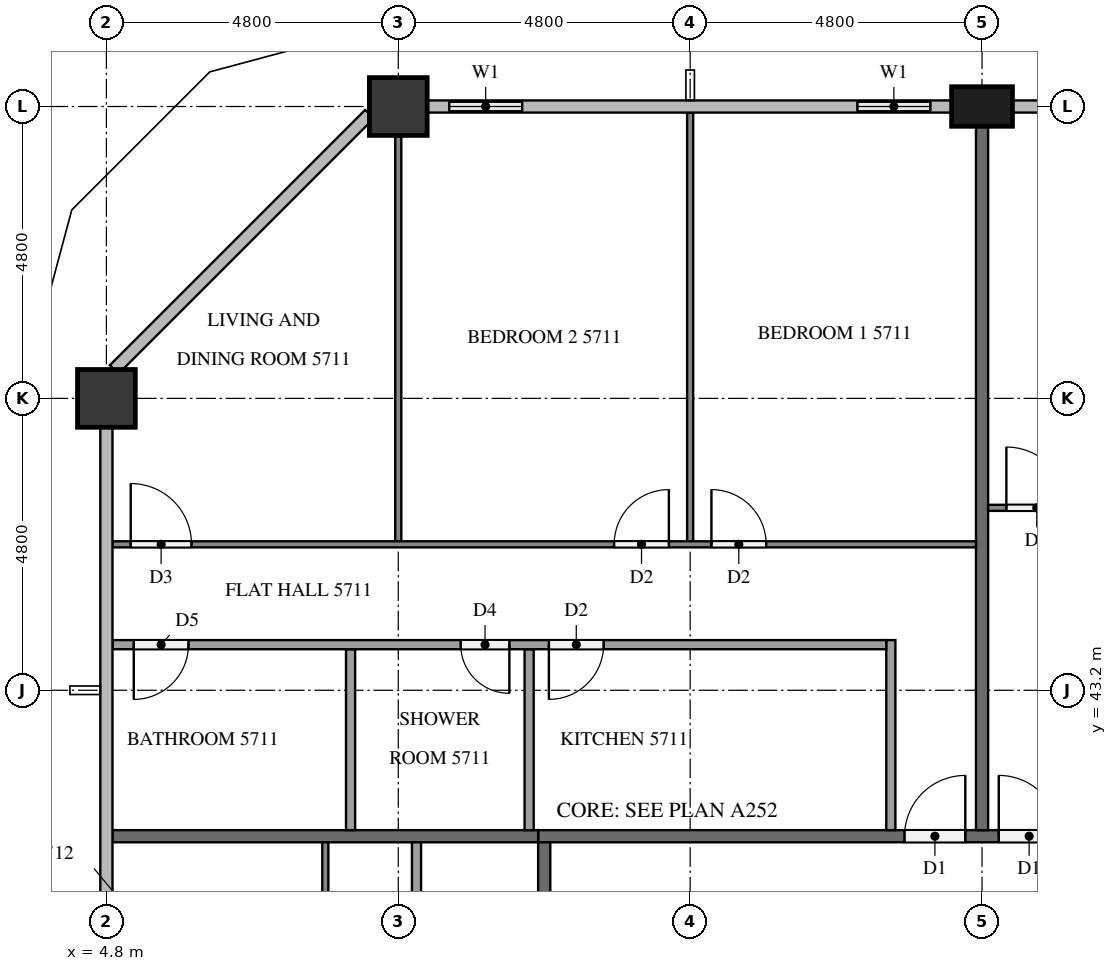
"""IFC4 building model, lengths in metres.
Left out: names, types, materials, properties, quantities, classifications, styles, units other than length and angle.
Written with IfcOpenShell. Run it as: python <this file> out.ifc"""

import sys

from ifc_helpers import new_model, si_unit, direction, frame, frame_2d, origin, origin_2d, place, context, subcontext, project, spatial, rectangle, extrude, element, fill, save


model = new_model("IFC4")
c1 = context("Model", 3, precision=1e-05, world=origin(), true_north=direction((0.0, 1.0)))
c2 = subcontext(c1, "Body", "Model", "MODEL_VIEW")
j1 = project(units=[si_unit("LENGTHUNIT", "METRE"), si_unit("PLANEANGLEUNIT", "RADIAN")], contexts=[c1])
p1 = place(None, origin())
s1 = spatial("IfcSite", under=j1, at=p1, CompositionType="ELEMENT")
p2 = place(p1, origin())
s2 = spatial("IfcBuilding", under=s1, at=p2, CompositionType="ELEMENT")
p3 = place(p2, frame((0.0, 0.0, 219.3)))
s3 = spatial("IfcBuildingStorey", under=s2, at=p3, CompositionType="ELEMENT", Elevation=219.3)
p4 = place(p3, frame((19.2, 52.8, 0.0), z_axis=(0.0, 0.0, 1.0), x_axis=(1.0, 0.0, 0.0)))
e1 = element("IfcColumn", 1, at=p4, inside=s3, PredefinedType="COLUMN", context=c2, shape_type="SweptSolid", body=[
    extrude(rectangle(XDim=1.0, YDim=0.65, at=origin_2d()), origin(), (0.0, 0.0, 1.0), 3.2),
])
for number, where, z_axis, x_axis in (
    (2, (9.6, 52.8, 0.0), (0.0, 0.0, 1.0), (1.0, 0.0, 0.0)),
    (3, (4.8, 48.0, 0.0), (0.0, 0.0, 1.0), (1.0, 0.0, 0.0)),
):
    element("IfcColumn", number, at=place(p3, frame(where, z_axis=z_axis, x_axis=x_axis)), inside=s3, PredefinedType="COLUMN", context=c2, shape_type="SweptSolid", body=[
        extrude(rectangle(XDim=0.95, YDim=0.95, at=origin_2d()), origin(), (0.0, 0.0, 1.0), 3.2),
    ])
p5 = place(p3, frame((18.7, 52.8, 0.0), z_axis=(0.0, 0.0, 1.0), x_axis=(-1.0, 0.0, 0.0)))
e4 = element("IfcWall", 4, at=p5, inside=s3, PredefinedType="SOLIDWALL", context=c2, shape_type="SweptSolid", body=[
    extrude(rectangle(XDim=1.9, YDim=0.15, at=frame_2d((0.95, 0.0))), origin(), (0.0, 0.0, 1.0), 3.2),
])
p6 = place(p5, frame((0.35, 0.0, 0.9)))
e5 = element("IfcOpeningElement", 5, at=p6, cuts=e4, PredefinedType="OPENING", context=c2, shape_type="SweptSolid", body=[
    extrude(rectangle(XDim=1.2, YDim=1.4, at=frame_2d((0.6, 0.7))), frame((0.0, 0.085, 0.0), z_axis=(0.0, -1.0, 0.0), x_axis=(1.0, 0.0, 0.0)), (0.0, 0.0, 1.0), 0.17),
])
p7 = place(p3, frame((12.0, 52.8, 0.0), z_axis=(0.0, 0.0, 1.0), x_axis=(-1.0, 0.0, 0.0)))
e6 = element("IfcWall", 6, at=p7, inside=s3, PredefinedType="SOLIDWALL", context=c2, shape_type="SweptSolid", body=[
    extrude(rectangle(XDim=1.925, YDim=0.15, at=frame_2d((0.962, 0.0))), origin(), (0.0, 0.0, 1.0), 3.2),
])
p8 = place(p7, frame((0.363, 0.0, 0.9)))
e7 = element("IfcOpeningElement", 7, at=p8, cuts=e6, PredefinedType="OPENING", context=c2, shape_type="SweptSolid", body=[
    extrude(rectangle(XDim=1.2, YDim=1.4, at=frame_2d((0.6, 0.7))), frame((0.0, 0.085, 0.0), z_axis=(0.0, -1.0, 0.0), x_axis=(1.0, 0.0, 0.0)), (0.0, 0.0, 1.0), 0.17),
])
p9 = place(p3, frame((11.9, 40.8, 0.0), z_axis=(0.0, 0.0, 1.0), x_axis=(1.0, 0.0, 0.0)))
e8 = element("IfcWall", 8, at=p9, inside=s3, PredefinedType="PARTITIONING", context=c2, shape_type="SweptSolid", body=[
    extrude(rectangle(XDim=38.6, YDim=0.2, at=frame_2d((19.3, 0.0))), origin(), (0.0, 0.0, 1.0), 3.2),
])
p10 = place(p9, frame((33.975, 0.0, 0.0)))
e9 = element("IfcOpeningElement", 9, at=p10, cuts=e8, PredefinedType="OPENING", context=c2, shape_type="SweptSolid", body=[
    extrude(rectangle(XDim=1.0, YDim=2.1, at=frame_2d((0.5, 1.05))), frame((0.0, 0.11, 0.0), z_axis=(0.0, -1.0, 0.0), x_axis=(1.0, 0.0, 0.0)), (0.0, 0.0, 1.0), 0.22),
])
p11 = place(p9, frame((14.725, 0.0, 0.0)))
e10 = element("IfcOpeningElement", 10, at=p11, cuts=e8, PredefinedType="OPENING", context=c2, shape_type="SweptSolid", body=[
    extrude(rectangle(XDim=1.1, YDim=2.1, at=frame_2d((0.55, 1.05))), frame((0.0, 0.11, 0.0), z_axis=(0.0, -1.0, 0.0), x_axis=(1.0, 0.0, 0.0)), (0.0, 0.0, 1.0), 0.22),
])
p12 = place(p9, frame((7.575, 0.0, 0.0)))
e11 = element("IfcOpeningElement", 11, at=p12, cuts=e8, PredefinedType="OPENING", context=c2, shape_type="SweptSolid", body=[
    extrude(rectangle(XDim=1.0, YDim=2.1, at=frame_2d((0.5, 1.05))), frame((0.0, 0.11, 0.0), z_axis=(0.0, -1.0, 0.0), x_axis=(1.0, 0.0, 0.0)), (0.0, 0.0, 1.0), 0.22),
])
p13 = place(p9, frame((6.025, 0.0, 0.0)))
e12 = element("IfcOpeningElement", 12, at=p13, cuts=e8, PredefinedType="OPENING", context=c2, shape_type="SweptSolid", body=[
    extrude(rectangle(XDim=1.0, YDim=2.1, at=frame_2d((0.5, 1.05))), frame((0.0, 0.11, 0.0), z_axis=(0.0, -1.0, 0.0), x_axis=(1.0, 0.0, 0.0)), (0.0, 0.0, 1.0), 0.22),
])
p14 = place(p3, frame((12.0, 12.1, 0.0), z_axis=(0.0, 0.0, 1.0), x_axis=(0.0, 1.0, 0.0)))
e13 = element("IfcWall", 13, at=p14, inside=s3, PredefinedType="PARTITIONING", context=c2, shape_type="SweptSolid", body=[
    extrude(rectangle(XDim=28.6, YDim=0.2, at=frame_2d((14.3, 0.0))), origin(), (0.0, 0.0, 1.0), 3.2),
])
p15 = place(p14, frame((9.725, 0.0, 0.0)))
e14 = element("IfcOpeningElement", 14, at=p15, cuts=e13, PredefinedType="OPENING", context=c2, shape_type="SweptSolid", body=[
    extrude(rectangle(XDim=1.1, YDim=2.1, at=frame_2d((0.55, 1.05))), frame((0.0, 0.11, 0.0), z_axis=(0.0, -1.0, 0.0), x_axis=(1.0, 0.0, 0.0)), (0.0, 0.0, 1.0), 0.22),
])
p16 = place(p14, frame((0.175, 0.0, 0.0)))
e15 = element("IfcOpeningElement", 15, at=p16, cuts=e13, PredefinedType="OPENING", context=c2, shape_type="SweptSolid", body=[
    extrude(rectangle(XDim=1.0, YDim=2.1, at=frame_2d((0.5, 1.05))), frame((0.0, 0.11, 0.0), z_axis=(0.0, -1.0, 0.0), x_axis=(1.0, 0.0, 0.0)), (0.0, 0.0, 1.0), 0.22),
])
p17 = place(p3, frame((19.2, 52.475, 0.0), z_axis=(0.0, 0.0, 1.0), x_axis=(0.0, -1.0, 0.0)))
e16 = element("IfcWall", 16, at=p17, inside=s3, PredefinedType="PARTITIONING", context=c2, shape_type="SweptSolid", body=[
    extrude(rectangle(XDim=11.575, YDim=0.2, at=frame_2d((5.788, 0.0))), origin(), (0.0, 0.0, 1.0), 3.2),
])
p18 = place(p3, frame((4.9, 40.8, 0.0), z_axis=(0.0, 0.0, 1.0), x_axis=(1.0, 0.0, 0.0)))
e17 = element("IfcWall", 17, at=p18, inside=s3, PredefinedType="PARTITIONING", context=c2, shape_type="SweptSolid", body=[
    extrude(rectangle(XDim=7.0, YDim=0.2, at=frame_2d((3.5, 0.0))), origin(), (0.0, 0.0, 1.0), 3.2),
])
p19 = place(p3, frame((19.3, 46.2, 0.0), z_axis=(0.0, 0.0, 1.0), x_axis=(1.0, 0.0, 0.0)))
e18 = element("IfcWall", 18, at=p19, inside=s3, PredefinedType="PARTITIONING", context=c2, shape_type="SweptSolid", body=[
    extrude(rectangle(XDim=7.0, YDim=0.1, at=frame_2d((3.5, 0.0))), origin(), (0.0, 0.0, 1.0), 3.2),
])
p20 = place(p19, frame((0.3, 0.0, 0.0)))
e19 = element("IfcOpeningElement", 19, at=p20, cuts=e18, PredefinedType="OPENING", context=c2, shape_type="SweptSolid", body=[
    extrude(rectangle(XDim=1.0, YDim=2.1, at=frame_2d((0.5, 1.05))), frame((0.0, 0.06, 0.0), z_axis=(0.0, -1.0, 0.0), x_axis=(1.0, 0.0, 0.0)), (0.0, 0.0, 1.0), 0.12),
])
p21 = place(p3, frame((14.4, 45.65, 0.0), z_axis=(0.0, 0.0, 1.0), x_axis=(0.0, 1.0, 0.0)))
e20 = element("IfcWall", 20, at=p21, inside=s3, PredefinedType="PARTITIONING", context=c2, shape_type="SweptSolid", body=[
    extrude(rectangle(XDim=7.05, YDim=0.1, at=frame_2d((3.525, 0.0))), origin(), (0.0, 0.0, 1.0), 3.2),
])
p22 = place(p3, frame((9.6, 45.65, 0.0), z_axis=(0.0, 0.0, 1.0), x_axis=(0.0, 1.0, 0.0)))
e21 = element("IfcWall", 21, at=p22, inside=s3, PredefinedType="PARTITIONING", context=c2, shape_type="SweptSolid", body=[
    extrude(rectangle(XDim=6.675, YDim=0.1, at=frame_2d((3.337, 0.0))), origin(), (0.0, 0.0, 1.0), 3.2),
])
p23 = place(p3, frame((4.9, 45.6, 0.0), z_axis=(0.0, 0.0, 1.0), x_axis=(1.0, 0.0, 0.0)))
e22 = element("IfcWall", 22, at=p23, inside=s3, PredefinedType="PARTITIONING", context=c2, shape_type="SweptSolid", body=[
    extrude(rectangle(XDim=14.2, YDim=0.1, at=frame_2d((7.1, 0.0))), origin(), (0.0, 0.0, 1.0), 3.2),
])
p24 = place(p23, frame((9.85, 0.0, 0.0)))
e23 = element("IfcOpeningElement", 23, at=p24, cuts=e22, PredefinedType="OPENING", context=c2, shape_type="SweptSolid", body=[
    extrude(rectangle(XDim=0.9, YDim=2.1, at=frame_2d((0.45, 1.05))), frame((0.0, 0.06, 0.0), z_axis=(0.0, -1.0, 0.0), x_axis=(1.0, 0.0, 0.0)), (0.0, 0.0, 1.0), 0.12),
])
p25 = place(p23, frame((8.25, 0.0, 0.0)))
e24 = element("IfcOpeningElement", 24, at=p25, cuts=e22, PredefinedType="OPENING", context=c2, shape_type="SweptSolid", body=[
    extrude(rectangle(XDim=0.9, YDim=2.1, at=frame_2d((0.45, 1.05))), frame((0.0, 0.06, 0.0), z_axis=(0.0, -1.0, 0.0), x_axis=(1.0, 0.0, 0.0)), (0.0, 0.0, 1.0), 0.12),
])
p26 = place(p23, frame((0.3, 0.0, 0.0)))
e25 = element("IfcOpeningElement", 25, at=p26, cuts=e22, PredefinedType="OPENING", context=c2, shape_type="SweptSolid", body=[
    extrude(rectangle(XDim=1.0, YDim=2.1, at=frame_2d((0.5, 1.05))), frame((0.0, 0.06, 0.0), z_axis=(0.0, -1.0, 0.0), x_axis=(1.0, 0.0, 0.0)), (0.0, 0.0, 1.0), 0.12),
])
for number, where, z_axis, x_axis in (
    (26, (11.752, 40.9, 0.0), (0.0, 0.0, 1.0), (0.0, 1.0, 0.0)),
    (27, (8.815, 40.9, 0.0), (0.0, 0.0, 1.0), (0.0, 1.0, 0.0)),
):
    element("IfcWall", number, at=place(p3, frame(where, z_axis=z_axis, x_axis=x_axis)), inside=s3, PredefinedType="PARTITIONING", context=c2, shape_type="SweptSolid", body=[
        extrude(rectangle(XDim=2.975, YDim=0.15, at=frame_2d((1.488, 0.0))), origin(), (0.0, 0.0, 1.0), 3.2),
    ])
p27 = place(p3, frame((17.7, 40.9, 0.0), z_axis=(0.0, 0.0, 1.0), x_axis=(0.0, 1.0, 0.0)))
e28 = element("IfcWall", 28, at=p27, inside=s3, PredefinedType="PARTITIONING", context=c2, shape_type="SweptSolid", body=[
    extrude(rectangle(XDim=3.125, YDim=0.15, at=frame_2d((1.562, 0.0))), origin(), (0.0, 0.0, 1.0), 3.2),
])
p28 = place(p3, frame((17.625, 43.95, 0.0), z_axis=(0.0, 0.0, 1.0), x_axis=(-1.0, 0.0, 0.0)))
e29 = element("IfcWall", 29, at=p28, inside=s3, PredefinedType="PARTITIONING", context=c2, shape_type="SweptSolid", body=[
    extrude(rectangle(XDim=12.725, YDim=0.15, at=frame_2d((6.363, 0.0))), origin(), (0.0, 0.0, 1.0), 3.2),
])
p29 = place(p28, frame((4.648, 0.0, 0.0)))
e30 = element("IfcOpeningElement", 30, at=p29, cuts=e29, PredefinedType="OPENING", context=c2, shape_type="SweptSolid", body=[
    extrude(rectangle(XDim=0.9, YDim=2.1, at=frame_2d((0.45, 1.05))), frame((0.0, 0.085, 0.0), z_axis=(0.0, -1.0, 0.0), x_axis=(1.0, 0.0, 0.0)), (0.0, 0.0, 1.0), 0.17),
])
p30 = place(p28, frame((6.198, 0.0, 0.0)))
e31 = element("IfcOpeningElement", 31, at=p30, cuts=e29, PredefinedType="OPENING", context=c2, shape_type="SweptSolid", body=[
    extrude(rectangle(XDim=0.8, YDim=2.1, at=frame_2d((0.4, 1.05))), frame((0.0, 0.085, 0.0), z_axis=(0.0, -1.0, 0.0), x_axis=(1.0, 0.0, 0.0)), (0.0, 0.0, 1.0), 0.17),
])
p31 = place(p28, frame((11.475, 0.0, 0.0)))
e32 = element("IfcOpeningElement", 32, at=p31, cuts=e29, PredefinedType="OPENING", context=c2, shape_type="SweptSolid", body=[
    extrude(rectangle(XDim=0.9, YDim=2.1, at=frame_2d((0.45, 1.05))), frame((0.0, 0.085, 0.0), z_axis=(0.0, -1.0, 0.0), x_axis=(1.0, 0.0, 0.0)), (0.0, 0.0, 1.0), 0.17),
])
p32 = place(p3, frame((8.4, 21.7, 0.0), z_axis=(0.0, 0.0, 1.0), x_axis=(0.0, 1.0, 0.0)))
e33 = element("IfcWall", 33, at=p32, inside=s3, PredefinedType="PARTITIONING", context=c2, shape_type="SweptSolid", body=[
    extrude(rectangle(XDim=19.0, YDim=0.1, at=frame_2d((9.5, 0.0))), origin(), (0.0, 0.0, 1.0), 3.2),
])
p33 = place(p32, frame((3.45, 0.0, 0.0)))
e34 = element("IfcOpeningElement", 34, at=p33, cuts=e33, PredefinedType="OPENING", context=c2, shape_type="SweptSolid", body=[
    extrude(rectangle(XDim=0.9, YDim=2.1, at=frame_2d((0.45, 1.05))), frame((0.0, 0.06, 0.0), z_axis=(0.0, -1.0, 0.0), x_axis=(1.0, 0.0, 0.0)), (0.0, 0.0, 1.0), 0.12),
])
p34 = place(p32, frame((5.05, 0.0, 0.0)))
e35 = element("IfcOpeningElement", 35, at=p34, cuts=e33, PredefinedType="OPENING", context=c2, shape_type="SweptSolid", body=[
    extrude(rectangle(XDim=0.9, YDim=2.1, at=frame_2d((0.45, 1.05))), frame((0.0, 0.06, 0.0), z_axis=(0.0, -1.0, 0.0), x_axis=(1.0, 0.0, 0.0)), (0.0, 0.0, 1.0), 0.12),
])
p35 = place(p32, frame((13.05, 0.0, 0.0)))
e36 = element("IfcOpeningElement", 36, at=p35, cuts=e33, PredefinedType="OPENING", context=c2, shape_type="SweptSolid", body=[
    extrude(rectangle(XDim=0.9, YDim=2.1, at=frame_2d((0.45, 1.05))), frame((0.0, 0.06, 0.0), z_axis=(0.0, -1.0, 0.0), x_axis=(1.0, 0.0, 0.0)), (0.0, 0.0, 1.0), 0.12),
])
p36 = place(p32, frame((14.65, 0.0, 0.0)))
e37 = element("IfcOpeningElement", 37, at=p36, cuts=e33, PredefinedType="OPENING", context=c2, shape_type="SweptSolid", body=[
    extrude(rectangle(XDim=1.0, YDim=2.1, at=frame_2d((0.5, 1.05))), frame((0.0, 0.06, 0.0), z_axis=(0.0, -1.0, 0.0), x_axis=(1.0, 0.0, 0.0)), (0.0, 0.0, 1.0), 0.12),
])
p37 = place(p3, frame((9.9, 40.7, 0.0), z_axis=(0.0, 0.0, 1.0), x_axis=(0.0, -1.0, 0.0)))
e38 = element("IfcWall", 38, at=p37, inside=s3, PredefinedType="PARTITIONING", context=c2, shape_type="SweptSolid", body=[
    extrude(rectangle(XDim=17.525, YDim=0.15, at=frame_2d((8.762, 0.0))), origin(), (0.0, 0.0, 1.0), 3.2),
])
p38 = place(p37, frame((14.564, 0.0, 0.0)))
e39 = element("IfcOpeningElement", 39, at=p38, cuts=e38, PredefinedType="OPENING", context=c2, shape_type="SweptSolid", body=[
    extrude(rectangle(XDim=0.8, YDim=2.1, at=frame_2d((0.4, 1.05))), frame((0.0, 0.085, 0.0), z_axis=(0.0, -1.0, 0.0), x_axis=(1.0, 0.0, 0.0)), (0.0, 0.0, 1.0), 0.17),
])
p39 = place(p37, frame((13.014, 0.0, 0.0)))
e40 = element("IfcOpeningElement", 40, at=p39, cuts=e38, PredefinedType="OPENING", context=c2, shape_type="SweptSolid", body=[
    extrude(rectangle(XDim=0.9, YDim=2.1, at=frame_2d((0.45, 1.05))), frame((0.0, 0.085, 0.0), z_axis=(0.0, -1.0, 0.0), x_axis=(1.0, 0.0, 0.0)), (0.0, 0.0, 1.0), 0.17),
])
p40 = place(p37, frame((6.897, 0.0, 0.0)))
e41 = element("IfcOpeningElement", 41, at=p40, cuts=e38, PredefinedType="OPENING", context=c2, shape_type="SweptSolid", body=[
    extrude(rectangle(XDim=0.8, YDim=2.1, at=frame_2d((0.4, 1.05))), frame((0.0, 0.085, 0.0), z_axis=(0.0, -1.0, 0.0), x_axis=(1.0, 0.0, 0.0)), (0.0, 0.0, 1.0), 0.17),
])
p41 = place(p37, frame((5.347, 0.0, 0.0)))
e42 = element("IfcOpeningElement", 42, at=p41, cuts=e38, PredefinedType="OPENING", context=c2, shape_type="SweptSolid", body=[
    extrude(rectangle(XDim=0.9, YDim=2.1, at=frame_2d((0.45, 1.05))), frame((0.0, 0.085, 0.0), z_axis=(0.0, -1.0, 0.0), x_axis=(1.0, 0.0, 0.0)), (0.0, 0.0, 1.0), 0.17),
])
p42 = place(p6, origin())
e43 = element("IfcWindow", 43, at=p42, inside=s3, PartitioningType="SINGLE_PANEL", PredefinedType="WINDOW", context=c2, shape_type="SweptSolid", body=[
    extrude(rectangle(XDim=1.2, YDim=1.4, at=frame_2d((0.6, 0.7))), frame((0.0, 0.03, 0.0), z_axis=(0.0, -1.0, 0.0), x_axis=(1.0, 0.0, 0.0)), (0.0, 0.0, 1.0), 0.06),
])
fill(e5, e43)
p43 = place(p8, origin())
e44 = element("IfcWindow", 44, at=p43, inside=s3, PartitioningType="SINGLE_PANEL", PredefinedType="WINDOW", context=c2, shape_type="SweptSolid", body=[
    extrude(rectangle(XDim=1.2, YDim=1.4, at=frame_2d((0.6, 0.7))), frame((0.0, 0.03, 0.0), z_axis=(0.0, -1.0, 0.0), x_axis=(1.0, 0.0, 0.0)), (0.0, 0.0, 1.0), 0.06),
])
fill(e7, e44)
p44 = place(p12, origin())
e45 = element("IfcDoor", 45, at=p44, inside=s3, OperationType="SINGLE_SWING_LEFT", PredefinedType="DOOR", context=c2, shape_type="SweptSolid", body=[
    extrude(rectangle(XDim=1.0, YDim=2.1, at=frame_2d((0.5, 1.05))), frame((0.0, 0.025, 0.0), z_axis=(0.0, -1.0, 0.0), x_axis=(1.0, 0.0, 0.0)), (0.0, 0.0, 1.0), 0.05),
])
fill(e11, e45)
p45 = place(p13, origin())
e46 = element("IfcDoor", 46, at=p45, inside=s3, OperationType="SINGLE_SWING_RIGHT", PredefinedType="DOOR", context=c2, shape_type="SweptSolid", body=[
    extrude(rectangle(XDim=1.0, YDim=2.1, at=frame_2d((0.5, 1.05))), frame((0.0, 0.025, 0.0), z_axis=(0.0, -1.0, 0.0), x_axis=(1.0, 0.0, 0.0)), (0.0, 0.0, 1.0), 0.05),
])
fill(e12, e46)
p46 = place(p20, origin())
e47 = element("IfcDoor", 47, at=p46, inside=s3, OperationType="SINGLE_SWING_LEFT", PredefinedType="DOOR", context=c2, shape_type="SweptSolid", body=[
    extrude(rectangle(XDim=1.0, YDim=2.1, at=frame_2d((0.5, 1.05))), frame((0.0, 0.025, 0.0), z_axis=(0.0, -1.0, 0.0), x_axis=(1.0, 0.0, 0.0)), (0.0, 0.0, 1.0), 0.05),
])
fill(e19, e47)
p47 = place(p24, origin())
e48 = element("IfcDoor", 48, at=p47, inside=s3, OperationType="SINGLE_SWING_LEFT", PredefinedType="DOOR", context=c2, shape_type="SweptSolid", body=[
    extrude(rectangle(XDim=0.9, YDim=2.1, at=frame_2d((0.45, 1.05))), frame((0.0, 0.025, 0.0), z_axis=(0.0, -1.0, 0.0), x_axis=(1.0, 0.0, 0.0)), (0.0, 0.0, 1.0), 0.05),
])
fill(e23, e48)
p48 = place(p25, origin())
e49 = element("IfcDoor", 49, at=p48, inside=s3, OperationType="SINGLE_SWING_RIGHT", PredefinedType="DOOR", context=c2, shape_type="SweptSolid", body=[
    extrude(rectangle(XDim=0.9, YDim=2.1, at=frame_2d((0.45, 1.05))), frame((0.0, 0.025, 0.0), z_axis=(0.0, -1.0, 0.0), x_axis=(1.0, 0.0, 0.0)), (0.0, 0.0, 1.0), 0.05),
])
fill(e24, e49)
p49 = place(p26, origin())
e50 = element("IfcDoor", 50, at=p49, inside=s3, OperationType="SINGLE_SWING_LEFT", PredefinedType="DOOR", context=c2, shape_type="SweptSolid", body=[
    extrude(rectangle(XDim=1.0, YDim=2.1, at=frame_2d((0.5, 1.05))), frame((0.0, 0.025, 0.0), z_axis=(0.0, -1.0, 0.0), x_axis=(1.0, 0.0, 0.0)), (0.0, 0.0, 1.0), 0.05),
])
fill(e25, e50)
p50 = place(p29, origin())
e51 = element("IfcDoor", 51, at=p50, inside=s3, OperationType="SINGLE_SWING_RIGHT", PredefinedType="DOOR", context=c2, shape_type="SweptSolid", body=[
    extrude(rectangle(XDim=0.9, YDim=2.1, at=frame_2d((0.45, 1.05))), frame((0.0, 0.025, 0.0), z_axis=(0.0, -1.0, 0.0), x_axis=(1.0, 0.0, 0.0)), (0.0, 0.0, 1.0), 0.05),
])
fill(e30, e51)
p51 = place(p30, origin())
e52 = element("IfcDoor", 52, at=p51, inside=s3, OperationType="SINGLE_SWING_LEFT", PredefinedType="DOOR", context=c2, shape_type="SweptSolid", body=[
    extrude(rectangle(XDim=0.8, YDim=2.1, at=frame_2d((0.4, 1.05))), frame((0.0, 0.025, 0.0), z_axis=(0.0, -1.0, 0.0), x_axis=(1.0, 0.0, 0.0)), (0.0, 0.0, 1.0), 0.05),
])
fill(e31, e52)
p52 = place(p31, origin())
e53 = element("IfcDoor", 53, at=p52, inside=s3, OperationType="SINGLE_SWING_RIGHT", PredefinedType="DOOR", context=c2, shape_type="SweptSolid", body=[
    extrude(rectangle(XDim=0.9, YDim=2.1, at=frame_2d((0.45, 1.05))), frame((0.0, 0.025, 0.0), z_axis=(0.0, -1.0, 0.0), x_axis=(1.0, 0.0, 0.0)), (0.0, 0.0, 1.0), 0.05),
])
fill(e32, e53)
save(model, sys.argv[1])
